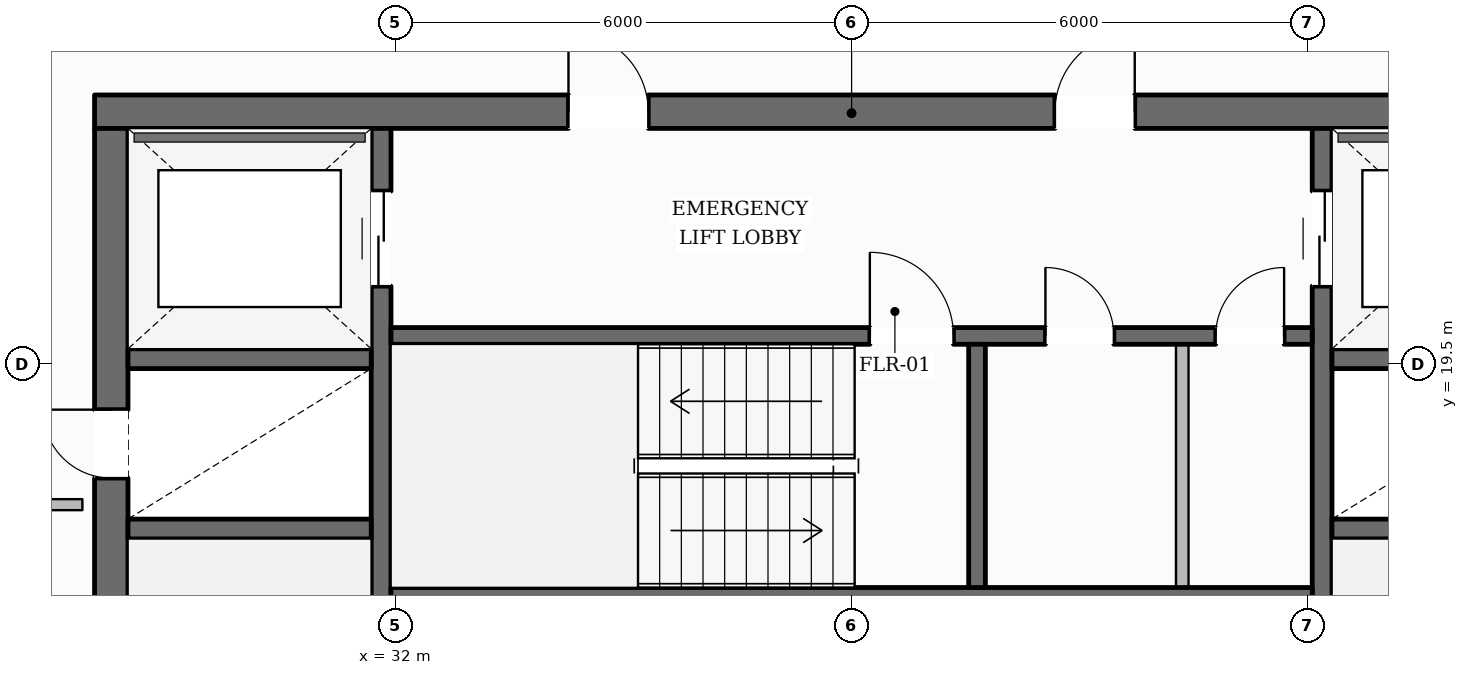
"""IFC4 building model, lengths in metres.
Left out: names, types, materials, properties, quantities, classifications, styles, units other than length and angle.
Written with IfcOpenShell. Run it as: python <this file> out.ifc"""

import sys

from ifc_helpers import new_model, si_unit, direction, frame, frame_2d, origin, place, context, subcontext, project, spatial, rectangle, extrude, element, fill, save


model = new_model("IFC4")
c1 = context("Model", 3, precision=1e-05, world=origin(), true_north=direction((0.0, 1.0)))
c2 = subcontext(c1, "Body", "Model", "MODEL_VIEW")
j1 = project(units=[si_unit("LENGTHUNIT", "METRE"), si_unit("PLANEANGLEUNIT", "RADIAN")], contexts=[c1])
p1 = place(None, origin())
s1 = spatial("IfcSite", under=j1, at=p1, CompositionType="ELEMENT")
p2 = place(p1, origin())
s2 = spatial("IfcBuilding", under=s1, at=p2, CompositionType="ELEMENT")
p3 = place(p2, frame((0.0, 0.0, 218.9)))
s3 = spatial("IfcBuildingStorey", under=s2, at=p3, CompositionType="ELEMENT", Elevation=218.9)
p4 = place(p3, frame((28.04, 22.82, 0.0), z_axis=(0.0, 0.0, 1.0), x_axis=(1.0, 0.0, 0.0)))
e1 = element("IfcWall", 1, at=p4, inside=s3, PredefinedType="SOLIDWALL", context=c2, shape_type="SweptSolid", body=[
    extrude(rectangle(XDim=19.92, YDim=0.44, at=frame_2d((9.96, 0.0))), origin(), (0.0, 0.0, 1.0), 3.6),
])
p5 = place(p4, frame((6.235, 0.0, 0.0)))
e2 = element("IfcOpeningElement", 2, at=p5, cuts=e1, PredefinedType="OPENING", context=c2, shape_type="SweptSolid", body=[
    extrude(rectangle(XDim=1.05, YDim=2.15, at=frame_2d((0.525, 1.075))), frame((0.0, 0.23, 0.0), z_axis=(0.0, -1.0, 0.0), x_axis=(1.0, 0.0, 0.0)), (0.0, 0.0, 1.0), 0.46),
])
p6 = place(p4, frame((12.635, 0.0, 0.0)))
e3 = element("IfcOpeningElement", 3, at=p6, cuts=e1, PredefinedType="OPENING", context=c2, shape_type="SweptSolid", body=[
    extrude(rectangle(XDim=1.05, YDim=2.15, at=frame_2d((0.525, 1.075))), frame((0.0, 0.23, 0.0), z_axis=(0.0, -1.0, 0.0), x_axis=(1.0, 0.0, 0.0)), (0.0, 0.0, 1.0), 0.46),
])
p7 = place(p3, frame((28.26, 9.6, 0.0), z_axis=(0.0, 0.0, 1.0), x_axis=(0.0, 1.0, 0.0)))
e4 = element("IfcWall", 4, at=p7, inside=s3, PredefinedType="SOLIDWALL", context=c2, shape_type="SweptSolid", body=[
    extrude(rectangle(XDim=13.0, YDim=0.44, at=frame_2d((6.5, 0.0))), origin(), (0.0, 0.0, 1.0), 3.6),
])
p8 = place(p7, frame((0.2, 0.0, 0.0)))
e5 = element("IfcOpeningElement", 5, at=p8, cuts=e4, PredefinedType="OPENING", context=c2, shape_type="SweptSolid", body=[
    extrude(rectangle(XDim=1.1, YDim=2.15, at=frame_2d((0.55, 1.075))), frame((0.0, 0.23, 0.0), z_axis=(0.0, -1.0, 0.0), x_axis=(1.0, 0.0, 0.0)), (0.0, 0.0, 1.0), 0.46),
])
p9 = place(p7, frame((8.4, 0.0, 0.0)))
e6 = element("IfcOpeningElement", 6, at=p9, cuts=e4, PredefinedType="OPENING", context=c2, shape_type="SweptSolid", body=[
    extrude(rectangle(XDim=0.9, YDim=2.1, at=frame_2d((0.45, 1.05))), frame((0.0, 0.23, 0.0), z_axis=(0.0, -1.0, 0.0), x_axis=(1.0, 0.0, 0.0)), (0.0, 0.0, 1.0), 0.46),
])
p10 = place(p3, frame((31.81, 9.6, 0.0), z_axis=(0.0, 0.0, 1.0), x_axis=(0.0, 1.0, 0.0)))
e7 = element("IfcWall", 7, at=p10, inside=s3, PredefinedType="SHEAR", context=c2, shape_type="SweptSolid", body=[
    extrude(rectangle(XDim=13.0, YDim=0.26, at=frame_2d((6.5, 0.0))), origin(), (0.0, 0.0, 1.0), 3.6),
])
p11 = place(p10, frame((10.925, 0.0, 0.0)))
e8 = element("IfcOpeningElement", 8, at=p11, cuts=e7, PredefinedType="OPENING", context=c2, shape_type="SweptSolid", body=[
    extrude(rectangle(XDim=1.25, YDim=2.25, at=frame_2d((0.625, 1.125))), frame((0.0, 0.14, 0.0), z_axis=(0.0, -1.0, 0.0), x_axis=(1.0, 0.0, 0.0)), (0.0, 0.0, 1.0), 0.28),
])
p12 = place(p3, frame((44.19, 9.6, 0.0), z_axis=(0.0, 0.0, 1.0), x_axis=(0.0, 1.0, 0.0)))
e9 = element("IfcWall", 9, at=p12, inside=s3, PredefinedType="SHEAR", context=c2, shape_type="SweptSolid", body=[
    extrude(rectangle(XDim=13.0, YDim=0.26, at=frame_2d((6.5, 0.0))), origin(), (0.0, 0.0, 1.0), 3.6),
])
p13 = place(p12, frame((10.925, 0.0, 0.0)))
e10 = element("IfcOpeningElement", 10, at=p13, cuts=e9, PredefinedType="OPENING", context=c2, shape_type="SweptSolid", body=[
    extrude(rectangle(XDim=1.25, YDim=2.25, at=frame_2d((0.625, 1.125))), frame((0.0, 0.14, 0.0), z_axis=(0.0, -1.0, 0.0), x_axis=(1.0, 0.0, 0.0)), (0.0, 0.0, 1.0), 0.28),
])
for number, where, z_axis, x_axis in (
    (11, (28.48, 17.33, 0.0), (0.0, 0.0, 1.0), (1.0, 0.0, 0.0)),
    (12, (28.48, 19.57, 0.0), (0.0, 0.0, 1.0), (1.0, 0.0, 0.0)),
    (13, (44.32, 17.33, 0.0), (0.0, 0.0, 1.0), (1.0, 0.0, 0.0)),
    (14, (44.32, 19.57, 0.0), (0.0, 0.0, 1.0), (1.0, 0.0, 0.0)),
):
    element("IfcWall", number, at=place(p3, frame(where, z_axis=z_axis, x_axis=x_axis)), inside=s3, PredefinedType="SHEAR", context=c2, shape_type="SweptSolid", body=[
        extrude(rectangle(XDim=3.2, YDim=0.26, at=frame_2d((1.6, 0.0))), origin(), (0.0, 0.0, 1.0), 3.6),
    ])
p14 = place(p3, frame((31.94, 19.87, 0.0), z_axis=(0.0, 0.0, 1.0), x_axis=(1.0, 0.0, 0.0)))
e15 = element("IfcWall", 15, at=p14, inside=s3, PredefinedType="SOLIDWALL", context=c2, shape_type="SweptSolid", body=[
    extrude(rectangle(XDim=12.12, YDim=0.22, at=frame_2d((6.06, 0.0))), origin(), (0.0, 0.0, 1.0), 3.6),
])
p15 = place(p14, frame((6.3, 0.0, 0.0)))
e16 = element("IfcOpeningElement", 16, at=p15, cuts=e15, PredefinedType="OPENING", context=c2, shape_type="SweptSolid", body=[
    extrude(rectangle(XDim=1.1, YDim=2.15, at=frame_2d((0.55, 1.075))), frame((0.0, 0.12, 0.0), z_axis=(0.0, -1.0, 0.0), x_axis=(1.0, 0.0, 0.0)), (0.0, 0.0, 1.0), 0.24),
])
p16 = place(p14, frame((8.61, 0.0, 0.0)))
e17 = element("IfcOpeningElement", 17, at=p16, cuts=e15, PredefinedType="OPENING", context=c2, shape_type="SweptSolid", body=[
    extrude(rectangle(XDim=0.9, YDim=2.1, at=frame_2d((0.45, 1.05))), frame((0.0, 0.12, 0.0), z_axis=(0.0, -1.0, 0.0), x_axis=(1.0, 0.0, 0.0)), (0.0, 0.0, 1.0), 0.24),
])
p17 = place(p14, frame((10.85, 0.0, 0.0)))
e18 = element("IfcOpeningElement", 18, at=p17, cuts=e15, PredefinedType="OPENING", context=c2, shape_type="SweptSolid", body=[
    extrude(rectangle(XDim=0.9, YDim=2.1, at=frame_2d((0.45, 1.05))), frame((0.0, 0.12, 0.0), z_axis=(0.0, -1.0, 0.0), x_axis=(1.0, 0.0, 0.0)), (0.0, 0.0, 1.0), 0.24),
])
p18 = place(p3, frame((31.94, 16.45, 0.0), z_axis=(0.0, 0.0, 1.0), x_axis=(1.0, 0.0, 0.0)))
e19 = element("IfcWall", 19, at=p18, inside=s3, PredefinedType="SOLIDWALL", context=c2, shape_type="SweptSolid", body=[
    extrude(rectangle(XDim=12.12, YDim=0.22, at=frame_2d((6.06, 0.0))), origin(), (0.0, 0.0, 1.0), 3.6),
])
p19 = place(p3, frame((39.65, 16.56, 0.0), z_axis=(0.0, 0.0, 1.0), x_axis=(0.0, 1.0, 0.0)))
e20 = element("IfcWall", 20, at=p19, inside=s3, PredefinedType="SOLIDWALL", context=c2, shape_type="SweptSolid", body=[
    extrude(rectangle(XDim=3.2, YDim=0.22, at=frame_2d((1.6, 0.0))), origin(), (0.0, 0.0, 1.0), 3.6),
])
p20 = place(p3, frame((14.171, 10.807, 0.0), z_axis=(0.0, 0.0, 1.0), x_axis=(0.504226548845, 0.86357141421, 0.0)))
e21 = element("IfcWall", 21, at=p20, inside=s3, PredefinedType="STANDARD", context=c2, shape_type="SweptSolid", body=[
    extrude(rectangle(XDim=39.276, YDim=0.35, at=frame_2d((19.638, 0.0))), origin(), (0.0, 0.0, 1.0), 3.132),
])
p21 = place(p20, frame((34.885, 0.0, 0.65)))
e22 = element("IfcOpeningElement", 22, at=p21, cuts=e21, PredefinedType="OPENING", context=c2, shape_type="SweptSolid", body=[
    extrude(rectangle(XDim=1.45, YDim=1.75, at=frame_2d((0.725, 0.875))), frame((0.0, 0.185, 0.0), z_axis=(0.0, -1.0, 0.0), x_axis=(1.0, 0.0, 0.0)), (0.0, 0.0, 1.0), 0.37),
])
p22 = place(p20, frame((28.497, 0.0, 0.65)))
e23 = element("IfcOpeningElement", 23, at=p22, cuts=e21, PredefinedType="OPENING", context=c2, shape_type="SweptSolid", body=[
    extrude(rectangle(XDim=1.45, YDim=1.75, at=frame_2d((0.725, 0.875))), frame((0.0, 0.185, 0.0), z_axis=(0.0, -1.0, 0.0), x_axis=(1.0, 0.0, 0.0)), (0.0, 0.0, 1.0), 0.37),
])
p23 = place(p20, frame((15.722, 0.0, 0.65)))
e24 = element("IfcOpeningElement", 24, at=p23, cuts=e21, PredefinedType="OPENING", context=c2, shape_type="SweptSolid", body=[
    extrude(rectangle(XDim=1.45, YDim=1.75, at=frame_2d((0.725, 0.875))), frame((0.0, 0.185, 0.0), z_axis=(0.0, -1.0, 0.0), x_axis=(1.0, 0.0, 0.0)), (0.0, 0.0, 1.0), 0.37),
])
p24 = place(p20, frame((9.334, 0.0, 0.65)))
e25 = element("IfcOpeningElement", 25, at=p24, cuts=e21, PredefinedType="OPENING", context=c2, shape_type="SweptSolid", body=[
    extrude(rectangle(XDim=1.45, YDim=1.75, at=frame_2d((0.725, 0.875))), frame((0.0, 0.185, 0.0), z_axis=(0.0, -1.0, 0.0), x_axis=(1.0, 0.0, 0.0)), (0.0, 0.0, 1.0), 0.37),
])
p25 = place(p20, frame((2.946, 0.0, 0.65)))
e26 = element("IfcOpeningElement", 26, at=p25, cuts=e21, PredefinedType="OPENING", context=c2, shape_type="SweptSolid", body=[
    extrude(rectangle(XDim=1.45, YDim=1.75, at=frame_2d((0.725, 0.875))), frame((0.0, 0.185, 0.0), z_axis=(0.0, -1.0, 0.0), x_axis=(1.0, 0.0, 0.0)), (0.0, 0.0, 1.0), 0.37),
])
p26 = place(p3, frame((41.881, 44.812, 0.0), z_axis=(0.0, 0.0, 1.0), x_axis=(0.495686807291, -0.868501346618, 0.0)))
e27 = element("IfcWall", 27, at=p26, inside=s3, PredefinedType="STANDARD", context=c2, shape_type="SweptSolid", body=[
    extrude(rectangle(XDim=38.618, YDim=0.35, at=frame_2d((19.309, 0.0))), origin(), (0.0, 0.0, 1.0), 3.132),
])
p27 = place(p26, frame((34.278, 0.0, 0.65)))
e28 = element("IfcOpeningElement", 28, at=p27, cuts=e27, PredefinedType="OPENING", context=c2, shape_type="SweptSolid", body=[
    extrude(rectangle(XDim=1.45, YDim=1.75, at=frame_2d((0.725, 0.875))), frame((0.0, 0.185, 0.0), z_axis=(0.0, -1.0, 0.0), x_axis=(1.0, 0.0, 0.0)), (0.0, 0.0, 1.0), 0.37),
])
p28 = place(p26, frame((28.001, 0.0, 0.65)))
e29 = element("IfcOpeningElement", 29, at=p28, cuts=e27, PredefinedType="OPENING", context=c2, shape_type="SweptSolid", body=[
    extrude(rectangle(XDim=1.45, YDim=1.75, at=frame_2d((0.725, 0.875))), frame((0.0, 0.185, 0.0), z_axis=(0.0, -1.0, 0.0), x_axis=(1.0, 0.0, 0.0)), (0.0, 0.0, 1.0), 0.37),
])
p29 = place(p26, frame((15.448, 0.0, 0.65)))
e30 = element("IfcOpeningElement", 30, at=p29, cuts=e27, PredefinedType="OPENING", context=c2, shape_type="SweptSolid", body=[
    extrude(rectangle(XDim=1.45, YDim=1.75, at=frame_2d((0.725, 0.875))), frame((0.0, 0.185, 0.0), z_axis=(0.0, -1.0, 0.0), x_axis=(1.0, 0.0, 0.0)), (0.0, 0.0, 1.0), 0.37),
])
p30 = place(p26, frame((9.172, 0.0, 0.65)))
e31 = element("IfcOpeningElement", 31, at=p30, cuts=e27, PredefinedType="OPENING", context=c2, shape_type="SweptSolid", body=[
    extrude(rectangle(XDim=1.45, YDim=1.75, at=frame_2d((0.725, 0.875))), frame((0.0, 0.185, 0.0), z_axis=(0.0, -1.0, 0.0), x_axis=(1.0, 0.0, 0.0)), (0.0, 0.0, 1.0), 0.37),
])
p31 = place(p26, frame((2.895, 0.0, 0.65)))
e32 = element("IfcOpeningElement", 32, at=p31, cuts=e27, PredefinedType="OPENING", context=c2, shape_type="SweptSolid", body=[
    extrude(rectangle(XDim=1.45, YDim=1.75, at=frame_2d((0.725, 0.875))), frame((0.0, 0.185, 0.0), z_axis=(0.0, -1.0, 0.0), x_axis=(1.0, 0.0, 0.0)), (0.0, 0.0, 1.0), 0.37),
])
p32 = place(p3, frame((42.35, 16.56, 0.0), z_axis=(0.0, 0.0, 1.0), x_axis=(0.0, 1.0, 0.0)))
e33 = element("IfcWall", 33, at=p32, inside=s3, PredefinedType="PARTITIONING", context=c2, shape_type="SweptSolid", body=[
    extrude(rectangle(XDim=3.2, YDim=0.165, at=frame_2d((1.6, 0.0))), origin(), (0.0, 0.0, 1.0), 3.6),
])
p33 = place(p3, frame((27.88, 17.65, 0.0), z_axis=(0.0, 0.0, 1.0), x_axis=(-1.0, 0.0, 0.0)))
e34 = element("IfcWall", 34, at=p33, inside=s3, PredefinedType="PARTITIONING", context=c2, shape_type="SweptSolid", body=[
    extrude(rectangle(XDim=1.82, YDim=0.145, at=frame_2d((0.91, 0.0))), origin(), (0.0, 0.0, 1.0), 3.6),
])
p34 = place(p15, origin())
e35 = element("IfcDoor", 35, at=p34, inside=s3, OperationType="SINGLE_SWING_LEFT", PredefinedType="DOOR", context=c2, shape_type="SweptSolid", body=[
    extrude(rectangle(XDim=1.1, YDim=2.15, at=frame_2d((0.55, 1.075))), frame((0.0, 0.025, 0.0), z_axis=(0.0, -1.0, 0.0), x_axis=(1.0, 0.0, 0.0)), (0.0, 0.0, 1.0), 0.05),
])
fill(e16, e35)
p35 = place(p9, origin())
e36 = element("IfcDoor", 36, at=p35, inside=s3, OperationType="SINGLE_SWING_RIGHT", PredefinedType="DOOR", context=c2, shape_type="SweptSolid", body=[
    extrude(rectangle(XDim=0.9, YDim=2.1, at=frame_2d((0.45, 1.05))), frame((0.0, 0.025, 0.0), z_axis=(0.0, -1.0, 0.0), x_axis=(1.0, 0.0, 0.0)), (0.0, 0.0, 1.0), 0.05),
])
fill(e6, e36)
p36 = place(p5, origin())
e37 = element("IfcDoor", 37, at=p36, inside=s3, OperationType="SINGLE_SWING_LEFT", PredefinedType="DOOR", context=c2, shape_type="SweptSolid", body=[
    extrude(rectangle(XDim=1.05, YDim=2.15, at=frame_2d((0.525, 1.075))), frame((0.0, 0.025, 0.0), z_axis=(0.0, -1.0, 0.0), x_axis=(1.0, 0.0, 0.0)), (0.0, 0.0, 1.0), 0.05),
])
fill(e2, e37)
p37 = place(p6, origin())
e38 = element("IfcDoor", 38, at=p37, inside=s3, OperationType="SINGLE_SWING_RIGHT", PredefinedType="DOOR", context=c2, shape_type="SweptSolid", body=[
    extrude(rectangle(XDim=1.05, YDim=2.15, at=frame_2d((0.525, 1.075))), frame((0.0, 0.025, 0.0), z_axis=(0.0, -1.0, 0.0), x_axis=(1.0, 0.0, 0.0)), (0.0, 0.0, 1.0), 0.05),
])
fill(e3, e38)
p38 = place(p11, origin())
e39 = element("IfcDoor", 39, at=p38, inside=s3, OperationType="DOUBLE_DOOR_SLIDING", PredefinedType="DOOR", context=c2, shape_type="SweptSolid", body=[
    extrude(rectangle(XDim=1.25, YDim=2.25, at=frame_2d((0.625, 1.125))), frame((0.0, 0.025, 0.0), z_axis=(0.0, -1.0, 0.0), x_axis=(1.0, 0.0, 0.0)), (0.0, 0.0, 1.0), 0.05),
])
fill(e8, e39)
p39 = place(p13, origin())
e40 = element("IfcDoor", 40, at=p39, inside=s3, OperationType="DOUBLE_DOOR_SLIDING", PredefinedType="DOOR", context=c2, shape_type="SweptSolid", body=[
    extrude(rectangle(XDim=1.25, YDim=2.25, at=frame_2d((0.625, 1.125))), frame((0.0, 0.025, 0.0), z_axis=(0.0, -1.0, 0.0), x_axis=(1.0, 0.0, 0.0)), (0.0, 0.0, 1.0), 0.05),
])
fill(e10, e40)
p40 = place(p16, origin())
e41 = element("IfcDoor", 41, at=p40, inside=s3, OperationType="SINGLE_SWING_LEFT", PredefinedType="DOOR", context=c2, shape_type="SweptSolid", body=[
    extrude(rectangle(XDim=0.9, YDim=2.1, at=frame_2d((0.45, 1.05))), frame((0.0, 0.025, 0.0), z_axis=(0.0, -1.0, 0.0), x_axis=(1.0, 0.0, 0.0)), (0.0, 0.0, 1.0), 0.05),
])
fill(e17, e41)
p41 = place(p17, origin())
e42 = element("IfcDoor", 42, at=p41, inside=s3, OperationType="SINGLE_SWING_RIGHT", PredefinedType="DOOR", context=c2, shape_type="SweptSolid", body=[
    extrude(rectangle(XDim=0.9, YDim=2.1, at=frame_2d((0.45, 1.05))), frame((0.0, 0.025, 0.0), z_axis=(0.0, -1.0, 0.0), x_axis=(1.0, 0.0, 0.0)), (0.0, 0.0, 1.0), 0.05),
])
fill(e18, e42)
save(model, sys.argv[1])
